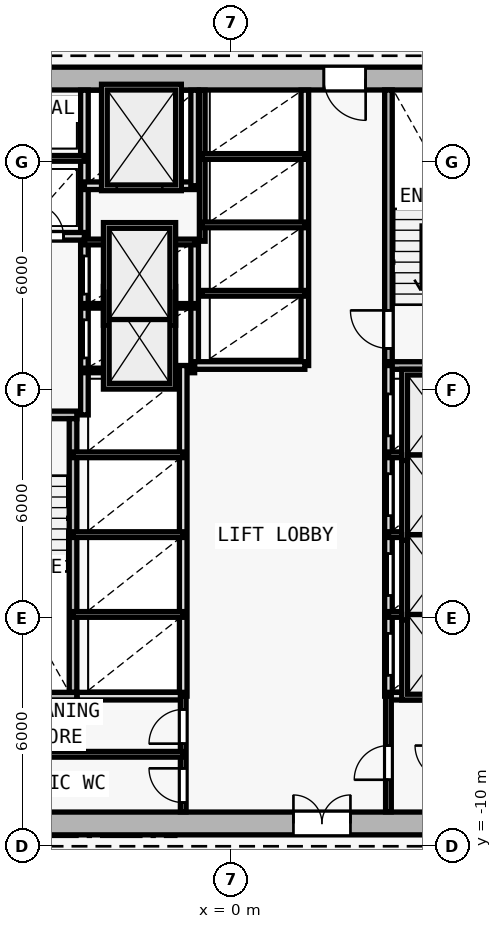
"""IFC4 building model, lengths in metres.
Left out: names, types, materials, properties, quantities, classifications, styles, units other than length and angle.
Written with IfcOpenShell. Run it as: python <this file> out.ifc"""

import sys

from ifc_helpers import new_model, si_unit, direction, frame, frame_2d, origin, origin_2d, place, context, subcontext, project, spatial, rectangle, i_section, extrude, element, fill, save


model = new_model("IFC4")
c1 = context("Model", 3, precision=1e-05, world=origin(), true_north=direction((0.0, 1.0)))
c2 = subcontext(c1, "Body", "Model", "MODEL_VIEW")
j1 = project(units=[si_unit("LENGTHUNIT", "METRE"), si_unit("PLANEANGLEUNIT", "RADIAN")], contexts=[c1])
p1 = place(None, origin())
s1 = spatial("IfcSite", under=j1, at=p1, CompositionType="ELEMENT")
p2 = place(p1, origin())
s2 = spatial("IfcBuilding", under=s1, at=p2, CompositionType="ELEMENT")
p3 = place(p2, frame((0.0, 0.0, 40.8)))
s3 = spatial("IfcBuildingStorey", under=s2, at=p3, CompositionType="ELEMENT", Elevation=40.8)
p4 = place(p3, frame((0.0, -9.4, 0.0), z_axis=(0.0, 0.0, 1.0), x_axis=(1.0, 0.0, 0.0)))
e1 = element("IfcColumn", 1, at=p4, inside=s3, PredefinedType="COLUMN", context=c2, shape_type="SweptSolid", body=[
    extrude(i_section(OverallWidth=0.416, OverallDepth=0.446, WebThickness=0.025, FlangeThickness=0.04, FilletRadius=0.015, at=origin_2d()), origin(), (0.0, 0.0, 1.0), 3.6),
])
p5 = place(p3, frame((-8.0, -9.4, 0.0), z_axis=(0.0, 0.0, 1.0), x_axis=(1.0, 0.0, 0.0)))
e2 = element("IfcWall", 2, at=p5, inside=s3, PredefinedType="SHEAR", context=c2, shape_type="SweptSolid", body=[
    extrude(rectangle(XDim=16.0, YDim=0.6, at=frame_2d((8.0, 0.0))), origin(), (0.0, 0.0, 1.0), 3.35),
])
p6 = place(p5, frame((9.65, 0.0, 0.0)))
e3 = element("IfcOpeningElement", 3, at=p6, cuts=e2, PredefinedType="OPENING", context=c2, shape_type="SweptSolid", body=[
    extrude(rectangle(XDim=1.5, YDim=2.2, at=frame_2d((0.75, 1.1))), frame((0.0, 0.31, 0.0), z_axis=(0.0, -1.0, 0.0), x_axis=(1.0, 0.0, 0.0)), (0.0, 0.0, 1.0), 0.62),
])
p7 = place(p3, frame((8.0, 10.2, 0.0), z_axis=(0.0, 0.0, 1.0), x_axis=(-1.0, 0.0, 0.0)))
e4 = element("IfcWall", 4, at=p7, inside=s3, PredefinedType="SHEAR", context=c2, shape_type="SweptSolid", body=[
    extrude(rectangle(XDim=16.0, YDim=0.6, at=frame_2d((8.0, 0.0))), origin(), (0.0, 0.0, 1.0), 3.35),
])
p8 = place(p7, frame((4.45, 0.0, 0.0)))
e5 = element("IfcOpeningElement", 5, at=p8, cuts=e4, PredefinedType="OPENING", context=c2, shape_type="SweptSolid", body=[
    extrude(rectangle(XDim=1.1, YDim=2.15, at=frame_2d((0.55, 1.075))), frame((0.0, 0.31, 0.0), z_axis=(0.0, -1.0, 0.0), x_axis=(1.0, 0.0, 0.0)), (0.0, 0.0, 1.0), 0.62),
])
p9 = place(p3, frame((-7.4, 1.35, 0.0), z_axis=(0.0, 0.0, 1.0), x_axis=(1.0, 0.0, 0.0)))
e6 = element("IfcWall", 6, at=p9, inside=s3, PredefinedType="SOLIDWALL", context=c2, shape_type="SweptSolid", body=[
    extrude(rectangle(XDim=3.35, YDim=0.2, at=frame_2d((1.675, 0.0))), origin(), (0.0, 0.0, 1.0), 3.35),
])
p10 = place(p9, frame((0.65, 0.0, 0.0)))
e7 = element("IfcOpeningElement", 7, at=p10, cuts=e6, PredefinedType="OPENING", context=c2, shape_type="SweptSolid", body=[
    extrude(rectangle(XDim=1.0, YDim=2.15, at=frame_2d((0.5, 1.075))), frame((0.0, 0.11, 0.0), z_axis=(0.0, -1.0, 0.0), x_axis=(1.0, 0.0, 0.0)), (0.0, 0.0, 1.0), 0.22),
])
p11 = place(p3, frame((-4.15, -5.95, 0.0), z_axis=(0.0, 0.0, 1.0), x_axis=(0.0, 1.0, 0.0)))
e8 = element("IfcWall", 8, at=p11, inside=s3, PredefinedType="SOLIDWALL", context=c2, shape_type="SweptSolid", body=[
    extrude(rectangle(XDim=7.2, YDim=0.2, at=frame_2d((3.6, 0.0))), origin(), (0.0, 0.0, 1.0), 3.35),
])
p12 = place(p3, frame((-3.85, 1.35, 0.0), z_axis=(0.0, 0.0, 1.0), x_axis=(0.0, 1.0, 0.0)))
e9 = element("IfcWall", 9, at=p12, inside=s3, PredefinedType="SOLIDWALL", context=c2, shape_type="SweptSolid", body=[
    extrude(rectangle(XDim=8.545, YDim=0.2, at=frame_2d((4.272, 0.0))), origin(), (0.0, 0.0, 1.0), 3.35),
])
p13 = place(p12, frame((1.5, 0.0, 0.0)))
e10 = element("IfcOpeningElement", 10, at=p13, cuts=e9, PredefinedType="OPENING", context=c2, shape_type="SweptSolid", body=[
    extrude(rectangle(XDim=1.0, YDim=2.15, at=frame_2d((0.5, 1.075))), frame((0.0, 0.11, 0.0), z_axis=(0.0, -1.0, 0.0), x_axis=(1.0, 0.0, 0.0)), (0.0, 0.0, 1.0), 0.22),
])
p14 = place(p12, frame((3.18, 0.0, 0.0)))
e11 = element("IfcOpeningElement", 11, at=p14, cuts=e9, PredefinedType="OPENING", context=c2, shape_type="SweptSolid", body=[
    extrude(rectangle(XDim=1.0, YDim=2.15, at=frame_2d((0.5, 1.075))), frame((0.0, 0.11, 0.0), z_axis=(0.0, -1.0, 0.0), x_axis=(1.0, 0.0, 0.0)), (0.0, 0.0, 1.0), 0.22),
])
p15 = place(p3, frame((-7.395, 6.05, 0.0), z_axis=(0.0, 0.0, 1.0), x_axis=(1.0, 0.0, 0.0)))
e12 = element("IfcWall", 12, at=p15, inside=s3, PredefinedType="SOLIDWALL", context=c2, shape_type="SweptSolid", body=[
    extrude(rectangle(XDim=3.545, YDim=0.2, at=frame_2d((1.772, 0.0))), origin(), (0.0, 0.0, 1.0), 3.35),
])
p16 = place(p15, frame((0.345, 0.0, 0.0)))
e13 = element("IfcOpeningElement", 13, at=p16, cuts=e12, PredefinedType="OPENING", context=c2, shape_type="SweptSolid", body=[
    extrude(rectangle(XDim=0.85, YDim=2.1, at=frame_2d((0.425, 1.05))), frame((0.0, 0.11, 0.0), z_axis=(0.0, -1.0, 0.0), x_axis=(1.0, 0.0, 0.0)), (0.0, 0.0, 1.0), 0.22),
])
p17 = place(p15, frame((2.145, 0.0, 0.0)))
e14 = element("IfcOpeningElement", 14, at=p17, cuts=e12, PredefinedType="OPENING", context=c2, shape_type="SweptSolid", body=[
    extrude(rectangle(XDim=0.85, YDim=2.1, at=frame_2d((0.425, 1.05))), frame((0.0, 0.11, 0.0), z_axis=(0.0, -1.0, 0.0), x_axis=(1.0, 0.0, 0.0)), (0.0, 0.0, 1.0), 0.22),
])
p18 = place(p3, frame((-7.395, 8.1, 0.0), z_axis=(0.0, 0.0, 1.0), x_axis=(1.0, 0.0, 0.0)))
e15 = element("IfcWall", 15, at=p18, inside=s3, PredefinedType="PARTITIONING", context=c2, shape_type="SweptSolid", body=[
    extrude(rectangle(XDim=3.545, YDim=0.15, at=frame_2d((1.772, 0.0))), origin(), (0.0, 0.0, 1.0), 3.35),
])
p19 = place(p3, frame((4.15, 2.75, 0.0), z_axis=(0.0, 0.0, 1.0), x_axis=(0.0, 1.0, 0.0)))
e16 = element("IfcWall", 16, at=p19, inside=s3, PredefinedType="SOLIDWALL", context=c2, shape_type="SweptSolid", body=[
    extrude(rectangle(XDim=7.15, YDim=0.2, at=frame_2d((3.575, 0.0))), origin(), (0.0, 0.0, 1.0), 3.35),
])
p20 = place(p19, frame((0.35, 0.0, 0.0)))
e17 = element("IfcOpeningElement", 17, at=p20, cuts=e16, PredefinedType="OPENING", context=c2, shape_type="SweptSolid", body=[
    extrude(rectangle(XDim=1.0, YDim=2.15, at=frame_2d((0.5, 1.075))), frame((0.0, 0.11, 0.0), z_axis=(0.0, -1.0, 0.0), x_axis=(1.0, 0.0, 0.0)), (0.0, 0.0, 1.0), 0.22),
])
p21 = place(p3, frame((4.05, 2.65, 0.0), z_axis=(0.0, 0.0, 1.0), x_axis=(1.0, 0.0, 0.0)))
e18 = element("IfcWall", 18, at=p21, inside=s3, PredefinedType="SOLIDWALL", context=c2, shape_type="SweptSolid", body=[
    extrude(rectangle(XDim=3.35, YDim=0.2, at=frame_2d((1.675, 0.0))), origin(), (0.0, 0.0, 1.0), 3.35),
])
p22 = place(p3, frame((-0.95, 2.65, 0.0), z_axis=(0.0, 0.0, 1.0), x_axis=(0.0, 1.0, 0.0)))
e19 = element("IfcWall", 19, at=p22, inside=s3, PredefinedType="SOLIDWALL", context=c2, shape_type="SweptSolid", body=[
    extrude(rectangle(XDim=3.27, YDim=0.2, at=frame_2d((1.635, 0.0))), origin(), (0.0, 0.0, 1.0), 3.35),
])
for number, where, z_axis, x_axis in (
    (20, (-3.85, 2.52, 0.0), (0.0, 0.0, 1.0), (1.0, 0.0, 0.0)),
    (21, (-3.85, 4.22, 0.0), (0.0, 0.0, 1.0), (1.0, 0.0, 0.0)),
):
    element("IfcWall", number, at=place(p3, frame(where, z_axis=z_axis, x_axis=x_axis)), inside=s3, PredefinedType="PARTITIONING", context=c2, shape_type="SweptSolid", body=[
        extrude(rectangle(XDim=2.9, YDim=0.12, at=frame_2d((1.45, 0.0))), origin(), (0.0, 0.0, 1.0), 3.35),
    ])
p23 = place(p3, frame((-3.85, 5.9, 0.0), z_axis=(0.0, 0.0, 1.0), x_axis=(1.0, 0.0, 0.0)))
e22 = element("IfcWall", 22, at=p23, inside=s3, PredefinedType="PARTITIONING", context=c2, shape_type="SweptSolid", body=[
    extrude(rectangle(XDim=2.9, YDim=0.15, at=frame_2d((1.45, 0.0))), origin(), (0.0, 0.0, 1.0), 3.35),
])
p24 = place(p3, frame((-3.85, 7.38, 0.0), z_axis=(0.0, 0.0, 1.0), x_axis=(1.0, 0.0, 0.0)))
e23 = element("IfcWall", 23, at=p24, inside=s3, PredefinedType="SOLIDWALL", context=c2, shape_type="SweptSolid", body=[
    extrude(rectangle(XDim=2.9, YDim=0.2, at=frame_2d((1.45, 0.0))), origin(), (0.0, 0.0, 1.0), 3.35),
])
p25 = place(p24, frame((0.85, 0.0, 0.0)))
e24 = element("IfcOpeningElement", 24, at=p25, cuts=e23, PredefinedType="OPENING", context=c2, shape_type="SweptSolid", body=[
    extrude(rectangle(XDim=1.2, YDim=2.2, at=frame_2d((0.6, 1.1))), frame((0.0, 0.11, 0.0), z_axis=(0.0, -1.0, 0.0), x_axis=(1.0, 0.0, 0.0)), (0.0, 0.0, 1.0), 0.22),
])
p26 = place(p3, frame((-0.95, 7.38, 0.0), z_axis=(0.0, 0.0, 1.0), x_axis=(0.0, 1.0, 0.0)))
e25 = element("IfcWall", 25, at=p26, inside=s3, PredefinedType="SOLIDWALL", context=c2, shape_type="SweptSolid", body=[
    extrude(rectangle(XDim=2.515, YDim=0.2, at=frame_2d((1.258, 0.0))), origin(), (0.0, 0.0, 1.0), 3.35),
])
p27 = place(p3, frame((4.15, -6.05, 0.0), z_axis=(0.0, 0.0, 1.0), x_axis=(0.0, 1.0, 0.0)))
e26 = element("IfcWall", 26, at=p27, inside=s3, PredefinedType="SOLIDWALL", context=c2, shape_type="SweptSolid", body=[
    extrude(rectangle(XDim=8.7, YDim=0.2, at=frame_2d((4.35, 0.0))), origin(), (0.0, 0.0, 1.0), 3.35),
])
p28 = place(p27, frame((0.55, 0.0, 0.0)))
e27 = element("IfcOpeningElement", 27, at=p28, cuts=e26, PredefinedType="OPENING", context=c2, shape_type="SweptSolid", body=[
    extrude(rectangle(XDim=1.1, YDim=2.15, at=frame_2d((0.55, 1.075))), frame((0.0, 0.11, 0.0), z_axis=(0.0, -1.0, 0.0), x_axis=(1.0, 0.0, 0.0)), (0.0, 0.0, 1.0), 0.22),
])
p29 = place(p27, frame((2.65, 0.0, 0.0)))
e28 = element("IfcOpeningElement", 28, at=p29, cuts=e26, PredefinedType="OPENING", context=c2, shape_type="SweptSolid", body=[
    extrude(rectangle(XDim=1.1, YDim=2.15, at=frame_2d((0.55, 1.075))), frame((0.0, 0.11, 0.0), z_axis=(0.0, -1.0, 0.0), x_axis=(1.0, 0.0, 0.0)), (0.0, 0.0, 1.0), 0.22),
])
p30 = place(p27, frame((4.75, 0.0, 0.0)))
e29 = element("IfcOpeningElement", 29, at=p30, cuts=e26, PredefinedType="OPENING", context=c2, shape_type="SweptSolid", body=[
    extrude(rectangle(XDim=1.1, YDim=2.15, at=frame_2d((0.55, 1.075))), frame((0.0, 0.11, 0.0), z_axis=(0.0, -1.0, 0.0), x_axis=(1.0, 0.0, 0.0)), (0.0, 0.0, 1.0), 0.22),
])
p31 = place(p27, frame((6.85, 0.0, 0.0)))
e30 = element("IfcOpeningElement", 30, at=p31, cuts=e26, PredefinedType="OPENING", context=c2, shape_type="SweptSolid", body=[
    extrude(rectangle(XDim=1.1, YDim=2.15, at=frame_2d((0.55, 1.075))), frame((0.0, 0.11, 0.0), z_axis=(0.0, -1.0, 0.0), x_axis=(1.0, 0.0, 0.0)), (0.0, 0.0, 1.0), 0.22),
])
for number, where, z_axis, x_axis in (
    (31, (4.15, -3.9, 0.0), (0.0, 0.0, 1.0), (1.0, 0.0, 0.0)),
    (32, (4.15, -1.8, 0.0), (0.0, 0.0, 1.0), (1.0, 0.0, 0.0)),
    (33, (4.15, 0.3, 0.0), (0.0, 0.0, 1.0), (1.0, 0.0, 0.0)),
):
    element("IfcWall", number, at=place(p3, frame(where, z_axis=z_axis, x_axis=x_axis)), inside=s3, PredefinedType="PARTITIONING", context=c2, shape_type="SweptSolid", body=[
        extrude(rectangle(XDim=2.6, YDim=0.15, at=frame_2d((1.3, 0.0))), origin(), (0.0, 0.0, 1.0), 3.35),
    ])
p32 = place(p3, frame((-1.25, -6.05, 0.0), z_axis=(0.0, 0.0, 1.0), x_axis=(0.0, 1.0, 0.0)))
e34 = element("IfcWall", 34, at=p32, inside=s3, PredefinedType="SOLIDWALL", context=c2, shape_type="SweptSolid", body=[
    extrude(rectangle(XDim=8.7, YDim=0.2, at=frame_2d((4.35, 0.0))), origin(), (0.0, 0.0, 1.0), 3.35),
])
for number, where, z_axis, x_axis in (
    (35, (-4.15, -3.9, 0.0), (0.0, 0.0, 1.0), (1.0, 0.0, 0.0)),
    (36, (-4.15, -1.8, 0.0), (0.0, 0.0, 1.0), (1.0, 0.0, 0.0)),
    (37, (-4.15, 0.3, 0.0), (0.0, 0.0, 1.0), (1.0, 0.0, 0.0)),
):
    element("IfcWall", number, at=place(p3, frame(where, z_axis=z_axis, x_axis=x_axis)), inside=s3, PredefinedType="PARTITIONING", context=c2, shape_type="SweptSolid", body=[
        extrude(rectangle(XDim=2.9, YDim=0.15, at=frame_2d((1.45, 0.0))), origin(), (0.0, 0.0, 1.0), 3.35),
    ])
p33 = place(p3, frame((1.95, 2.65, 0.0), z_axis=(0.0, 0.0, 1.0), x_axis=(0.0, 1.0, 0.0)))
e38 = element("IfcWall", 38, at=p33, inside=s3, PredefinedType="SOLIDWALL", context=c2, shape_type="SweptSolid", body=[
    extrude(rectangle(XDim=7.245, YDim=0.2, at=frame_2d((3.623, 0.0))), origin(), (0.0, 0.0, 1.0), 3.35),
])
p34 = place(p3, frame((-0.95, 2.65, 0.0), z_axis=(0.0, 0.0, 1.0), x_axis=(1.0, 0.0, 0.0)))
e39 = element("IfcWall", 39, at=p34, inside=s3, PredefinedType="SOLIDWALL", context=c2, shape_type="SweptSolid", body=[
    extrude(rectangle(XDim=2.9, YDim=0.2, at=frame_2d((1.45, 0.0))), origin(), (0.0, 0.0, 1.0), 3.35),
])
p35 = place(p3, frame((-0.75, 5.92, 0.0), z_axis=(0.0, 0.0, 1.0), x_axis=(0.0, 1.0, 0.0)))
e40 = element("IfcWall", 40, at=p35, inside=s3, PredefinedType="PARTITIONING", context=c2, shape_type="SweptSolid", body=[
    extrude(rectangle(XDim=3.975, YDim=0.15, at=frame_2d((1.988, 0.0))), origin(), (0.0, 0.0, 1.0), 3.35),
])
for number, where, z_axis, x_axis in (
    (41, (-0.75, 4.55, 0.0), (0.0, 0.0, 1.0), (1.0, 0.0, 0.0)),
    (42, (-0.75, 6.35, 0.0), (0.0, 0.0, 1.0), (1.0, 0.0, 0.0)),
    (43, (-0.75, 8.15, 0.0), (0.0, 0.0, 1.0), (1.0, 0.0, 0.0)),
):
    element("IfcWall", number, at=place(p3, frame(where, z_axis=z_axis, x_axis=x_axis)), inside=s3, PredefinedType="PARTITIONING", context=c2, shape_type="SweptSolid", body=[
        extrude(rectangle(XDim=2.7, YDim=0.15, at=frame_2d((1.35, 0.0))), origin(), (0.0, 0.0, 1.0), 3.35),
    ])
p36 = place(p3, frame((-7.4, -6.05, 0.0), z_axis=(0.0, 0.0, 1.0), x_axis=(1.0, 0.0, 0.0)))
e44 = element("IfcWall", 44, at=p36, inside=s3, PredefinedType="SOLIDWALL", context=c2, shape_type="SweptSolid", body=[
    extrude(rectangle(XDim=3.35, YDim=0.2, at=frame_2d((1.675, 0.0))), origin(), (0.0, 0.0, 1.0), 3.35),
])
p37 = place(p3, frame((-4.04, -6.05, 0.0), z_axis=(0.0, 0.0, 1.0), x_axis=(1.0, 0.0, 0.0)))
e45 = element("IfcWall", 45, at=p37, inside=s3, PredefinedType="SOLIDWALL", context=c2, shape_type="SweptSolid", body=[
    extrude(rectangle(XDim=2.79, YDim=0.2, at=frame_2d((1.395, 0.0))), origin(), (0.0, 0.0, 1.0), 3.35),
])
p38 = place(p3, frame((4.15, -6.05, 0.0), z_axis=(0.0, 0.0, 1.0), x_axis=(1.0, 0.0, 0.0)))
e46 = element("IfcWall", 46, at=p38, inside=s3, PredefinedType="SOLIDWALL", context=c2, shape_type="SweptSolid", body=[
    extrude(rectangle(XDim=3.245, YDim=0.2, at=frame_2d((1.623, 0.0))), origin(), (0.0, 0.0, 1.0), 3.35),
])
p39 = place(p3, frame((-1.25, -9.095, 0.0), z_axis=(0.0, 0.0, 1.0), x_axis=(0.0, 1.0, 0.0)))
e47 = element("IfcWall", 47, at=p39, inside=s3, PredefinedType="PARTITIONING", context=c2, shape_type="SweptSolid", body=[
    extrude(rectangle(XDim=3.045, YDim=0.15, at=frame_2d((1.522, 0.0))), origin(), (0.0, 0.0, 1.0), 3.35),
])
p40 = place(p39, frame((1.795, 0.0, 0.0)))
e48 = element("IfcOpeningElement", 48, at=p40, cuts=e47, PredefinedType="OPENING", context=c2, shape_type="SweptSolid", body=[
    extrude(rectangle(XDim=0.9, YDim=2.1, at=frame_2d((0.45, 1.05))), frame((0.0, 0.085, 0.0), z_axis=(0.0, -1.0, 0.0), x_axis=(1.0, 0.0, 0.0)), (0.0, 0.0, 1.0), 0.17),
])
p41 = place(p39, frame((0.245, 0.0, 0.0)))
e49 = element("IfcOpeningElement", 49, at=p41, cuts=e47, PredefinedType="OPENING", context=c2, shape_type="SweptSolid", body=[
    extrude(rectangle(XDim=0.9, YDim=2.1, at=frame_2d((0.45, 1.05))), frame((0.0, 0.085, 0.0), z_axis=(0.0, -1.0, 0.0), x_axis=(1.0, 0.0, 0.0)), (0.0, 0.0, 1.0), 0.17),
])
p42 = place(p3, frame((4.15, -9.095, 0.0), z_axis=(0.0, 0.0, 1.0), x_axis=(0.0, 1.0, 0.0)))
e50 = element("IfcWall", 50, at=p42, inside=s3, PredefinedType="PARTITIONING", context=c2, shape_type="SweptSolid", body=[
    extrude(rectangle(XDim=3.045, YDim=0.15, at=frame_2d((1.522, 0.0))), origin(), (0.0, 0.0, 1.0), 3.35),
])
p43 = place(p42, frame((0.845, 0.0, 0.0)))
e51 = element("IfcOpeningElement", 51, at=p43, cuts=e50, PredefinedType="OPENING", context=c2, shape_type="SweptSolid", body=[
    extrude(rectangle(XDim=0.9, YDim=2.1, at=frame_2d((0.45, 1.05))), frame((0.0, 0.085, 0.0), z_axis=(0.0, -1.0, 0.0), x_axis=(1.0, 0.0, 0.0)), (0.0, 0.0, 1.0), 0.17),
])
p44 = place(p3, frame((-7.395, -7.58, 0.0), z_axis=(0.0, 0.0, 1.0), x_axis=(1.0, 0.0, 0.0)))
e52 = element("IfcWall", 52, at=p44, inside=s3, PredefinedType="PARTITIONING", context=c2, shape_type="SweptSolid", body=[
    extrude(rectangle(XDim=6.145, YDim=0.15, at=frame_2d((3.073, 0.0))), origin(), (0.0, 0.0, 1.0), 3.35),
])
p45 = place(p6, origin())
e53 = element("IfcDoor", 53, at=p45, inside=s3, OperationType="DOUBLE_DOOR_SINGLE_SWING", PredefinedType="DOOR", context=c2, shape_type="SweptSolid", body=[
    extrude(rectangle(XDim=1.5, YDim=2.2, at=frame_2d((0.75, 1.1))), frame((0.0, 0.025, 0.0), z_axis=(0.0, -1.0, 0.0), x_axis=(1.0, 0.0, 0.0)), (0.0, 0.0, 1.0), 0.05),
])
fill(e3, e53)
p46 = place(p8, origin())
e54 = element("IfcDoor", 54, at=p46, inside=s3, OperationType="SINGLE_SWING_LEFT", PredefinedType="DOOR", context=c2, shape_type="SweptSolid", body=[
    extrude(rectangle(XDim=1.1, YDim=2.15, at=frame_2d((0.55, 1.075))), frame((0.0, 0.025, 0.0), z_axis=(0.0, -1.0, 0.0), x_axis=(1.0, 0.0, 0.0)), (0.0, 0.0, 1.0), 0.05),
])
fill(e5, e54)
p47 = place(p17, origin())
e55 = element("IfcDoor", 55, at=p47, inside=s3, OperationType="SINGLE_SWING_LEFT", PredefinedType="DOOR", context=c2, shape_type="SweptSolid", body=[
    extrude(rectangle(XDim=0.85, YDim=2.1, at=frame_2d((0.425, 1.05))), frame((0.0, 0.025, 0.0), z_axis=(0.0, -1.0, 0.0), x_axis=(1.0, 0.0, 0.0)), (0.0, 0.0, 1.0), 0.05),
])
fill(e14, e55)
p48 = place(p20, origin())
e56 = element("IfcDoor", 56, at=p48, inside=s3, OperationType="SINGLE_SWING_RIGHT", PredefinedType="DOOR", context=c2, shape_type="SweptSolid", body=[
    extrude(rectangle(XDim=1.0, YDim=2.15, at=frame_2d((0.5, 1.075))), frame((0.0, 0.025, 0.0), z_axis=(0.0, -1.0, 0.0), x_axis=(1.0, 0.0, 0.0)), (0.0, 0.0, 1.0), 0.05),
])
fill(e17, e56)
p49 = place(p25, origin())
e57 = element("IfcDoor", 57, at=p49, inside=s3, OperationType="DOUBLE_DOOR_SLIDING", PredefinedType="DOOR", context=c2, shape_type="SweptSolid", body=[
    extrude(rectangle(XDim=1.2, YDim=2.2, at=frame_2d((0.6, 1.1))), frame((0.0, 0.025, 0.0), z_axis=(0.0, -1.0, 0.0), x_axis=(1.0, 0.0, 0.0)), (0.0, 0.0, 1.0), 0.05),
])
fill(e24, e57)
p50 = place(p28, origin())
e58 = element("IfcDoor", 58, at=p50, inside=s3, OperationType="DOUBLE_DOOR_SLIDING", PredefinedType="DOOR", context=c2, shape_type="SweptSolid", body=[
    extrude(rectangle(XDim=1.1, YDim=2.15, at=frame_2d((0.55, 1.075))), frame((0.0, 0.025, 0.0), z_axis=(0.0, -1.0, 0.0), x_axis=(1.0, 0.0, 0.0)), (0.0, 0.0, 1.0), 0.05),
])
fill(e27, e58)
p51 = place(p29, origin())
e59 = element("IfcDoor", 59, at=p51, inside=s3, OperationType="DOUBLE_DOOR_SLIDING", PredefinedType="DOOR", context=c2, shape_type="SweptSolid", body=[
    extrude(rectangle(XDim=1.1, YDim=2.15, at=frame_2d((0.55, 1.075))), frame((0.0, 0.025, 0.0), z_axis=(0.0, -1.0, 0.0), x_axis=(1.0, 0.0, 0.0)), (0.0, 0.0, 1.0), 0.05),
])
fill(e28, e59)
p52 = place(p30, origin())
e60 = element("IfcDoor", 60, at=p52, inside=s3, OperationType="DOUBLE_DOOR_SLIDING", PredefinedType="DOOR", context=c2, shape_type="SweptSolid", body=[
    extrude(rectangle(XDim=1.1, YDim=2.15, at=frame_2d((0.55, 1.075))), frame((0.0, 0.025, 0.0), z_axis=(0.0, -1.0, 0.0), x_axis=(1.0, 0.0, 0.0)), (0.0, 0.0, 1.0), 0.05),
])
fill(e29, e60)
p53 = place(p31, origin())
e61 = element("IfcDoor", 61, at=p53, inside=s3, OperationType="DOUBLE_DOOR_SLIDING", PredefinedType="DOOR", context=c2, shape_type="SweptSolid", body=[
    extrude(rectangle(XDim=1.1, YDim=2.15, at=frame_2d((0.55, 1.075))), frame((0.0, 0.025, 0.0), z_axis=(0.0, -1.0, 0.0), x_axis=(1.0, 0.0, 0.0)), (0.0, 0.0, 1.0), 0.05),
])
fill(e30, e61)
p54 = place(p13, origin())
e62 = element("IfcDoor", 62, at=p54, inside=s3, OperationType="DOUBLE_DOOR_SLIDING", PredefinedType="DOOR", context=c2, shape_type="SweptSolid", body=[
    extrude(rectangle(XDim=1.0, YDim=2.15, at=frame_2d((0.5, 1.075))), frame((0.0, 0.025, 0.0), z_axis=(0.0, -1.0, 0.0), x_axis=(1.0, 0.0, 0.0)), (0.0, 0.0, 1.0), 0.05),
])
fill(e10, e62)
p55 = place(p14, origin())
e63 = element("IfcDoor", 63, at=p55, inside=s3, OperationType="DOUBLE_DOOR_SLIDING", PredefinedType="DOOR", context=c2, shape_type="SweptSolid", body=[
    extrude(rectangle(XDim=1.0, YDim=2.15, at=frame_2d((0.5, 1.075))), frame((0.0, 0.025, 0.0), z_axis=(0.0, -1.0, 0.0), x_axis=(1.0, 0.0, 0.0)), (0.0, 0.0, 1.0), 0.05),
])
fill(e11, e63)
p56 = place(p40, origin())
e64 = element("IfcDoor", 64, at=p56, inside=s3, OperationType="SINGLE_SWING_LEFT", PredefinedType="DOOR", context=c2, shape_type="SweptSolid", body=[
    extrude(rectangle(XDim=0.9, YDim=2.1, at=frame_2d((0.45, 1.05))), frame((0.0, 0.025, 0.0), z_axis=(0.0, -1.0, 0.0), x_axis=(1.0, 0.0, 0.0)), (0.0, 0.0, 1.0), 0.05),
])
fill(e48, e64)
p57 = place(p41, origin())
e65 = element("IfcDoor", 65, at=p57, inside=s3, OperationType="SINGLE_SWING_RIGHT", PredefinedType="DOOR", context=c2, shape_type="SweptSolid", body=[
    extrude(rectangle(XDim=0.9, YDim=2.1, at=frame_2d((0.45, 1.05))), frame((0.0, 0.025, 0.0), z_axis=(0.0, -1.0, 0.0), x_axis=(1.0, 0.0, 0.0)), (0.0, 0.0, 1.0), 0.05),
])
fill(e49, e65)
p58 = place(p43, origin())
e66 = element("IfcDoor", 66, at=p58, inside=s3, OperationType="SINGLE_SWING_LEFT", PredefinedType="DOOR", context=c2, shape_type="SweptSolid", body=[
    extrude(rectangle(XDim=0.9, YDim=2.1, at=frame_2d((0.45, 1.05))), frame((0.0, 0.025, 0.0), z_axis=(0.0, -1.0, 0.0), x_axis=(1.0, 0.0, 0.0)), (0.0, 0.0, 1.0), 0.05),
])
fill(e51, e66)
save(model, sys.argv[1])
